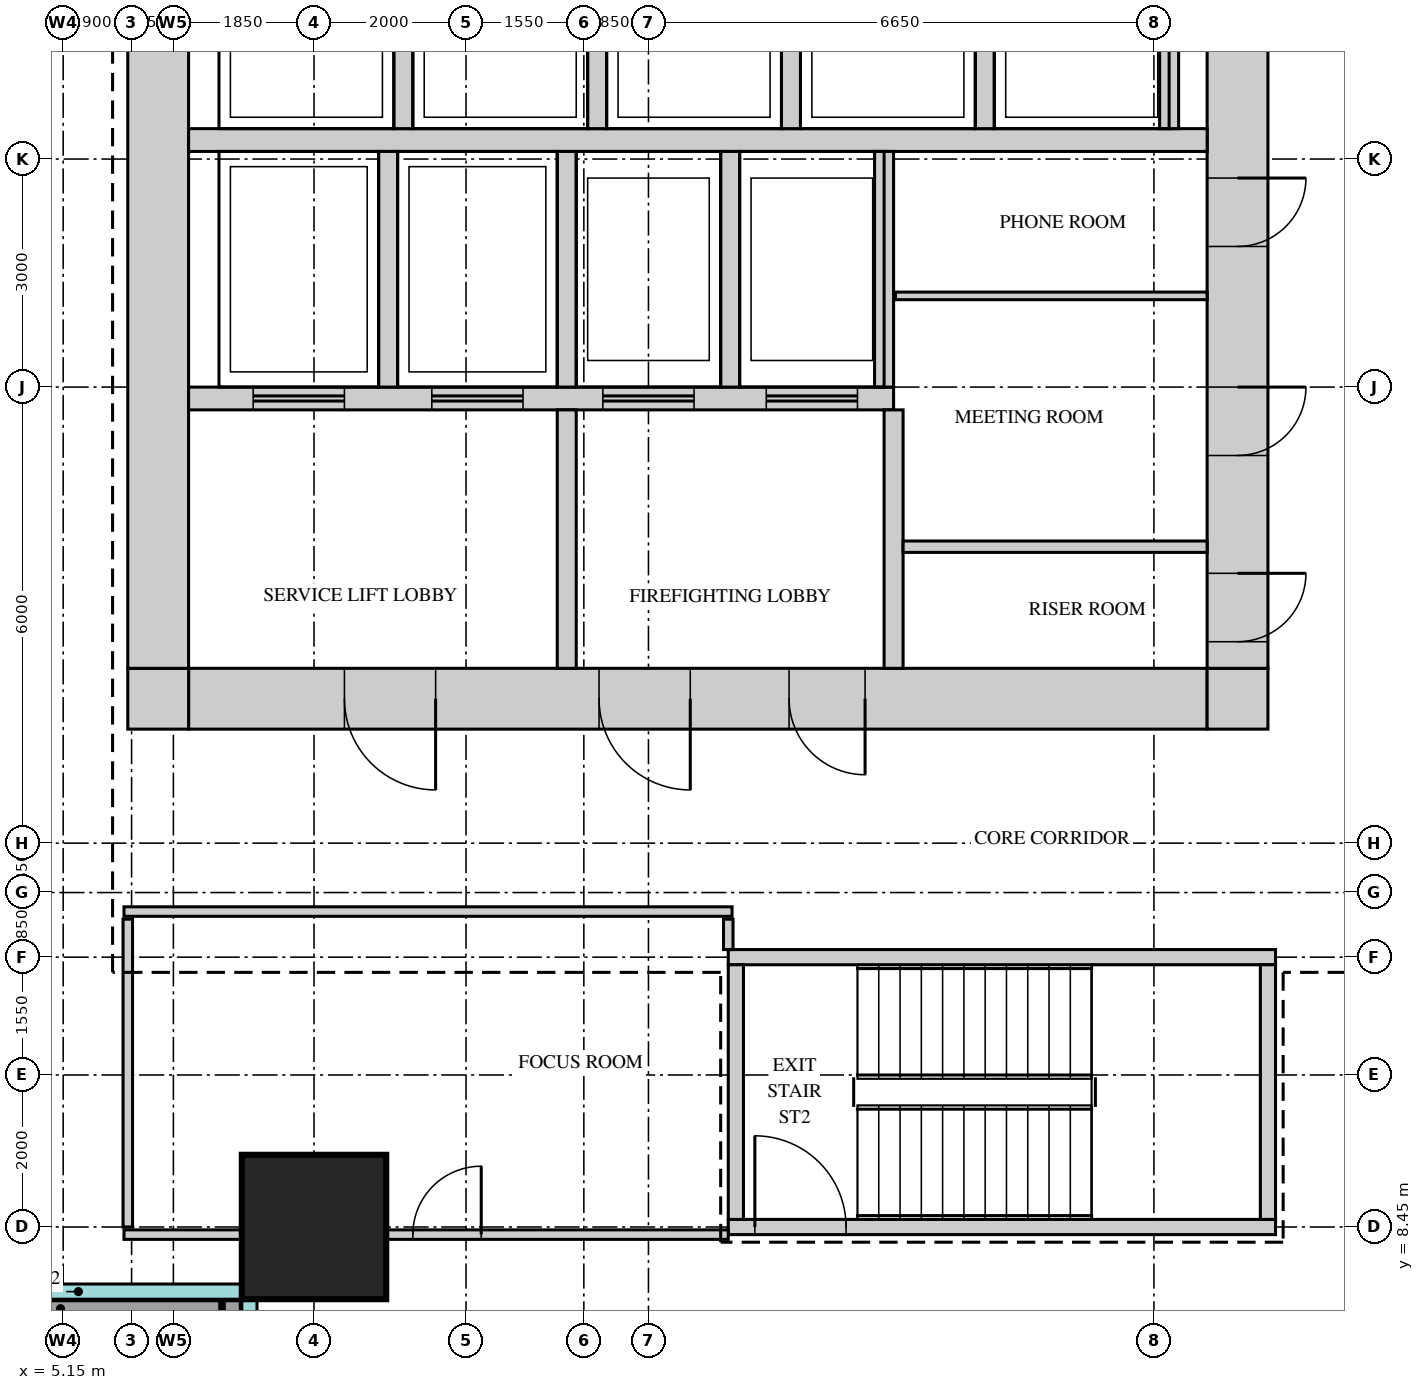
"""IFC4 building model, lengths in metres.
Left out: names, types, materials, properties, quantities, classifications, styles, units other than length and angle.
Written with IfcOpenShell. Run it as: python <this file> out.ifc"""

import sys

from ifc_helpers import new_model, si_unit, direction, frame, frame_2d, origin, origin_2d, place, context, subcontext, project, spatial, rectangle, extrude, source, transform, mapped, element, fill, save


model = new_model("IFC4")
c1 = context("Model", 3, precision=1e-05, world=origin(), true_north=direction((0.0, 1.0)))
c2 = subcontext(c1, "Body", "Model", "MODEL_VIEW")
j1 = project(units=[si_unit("LENGTHUNIT", "METRE"), si_unit("PLANEANGLEUNIT", "RADIAN")], contexts=[c1])
p1 = place(None, origin())
s1 = spatial("IfcSite", under=j1, at=p1, CompositionType="ELEMENT")
p2 = place(p1, origin())
s2 = spatial("IfcBuilding", under=s1, at=p2, CompositionType="ELEMENT")
p3 = place(p2, frame((0.0, 0.0, 164.7)))
s3 = spatial("IfcBuildingStorey", under=s2, at=p3, CompositionType="ELEMENT", Elevation=164.7)
m1 = source(origin(), c2, "Body", "SweptSolid", [
    extrude(rectangle(XDim=13.4, YDim=0.8, at=frame_2d((6.7, 0.0))), origin(), (0.0, 0.0, 1.0), 3.75),
])
p4 = place(p3, frame((6.8, 15.4, 0.0), z_axis=(0.0, 0.0, 1.0), x_axis=(1.0, 0.0, 0.0)))
e1 = element("IfcWall", 1, at=p4, inside=s3, PredefinedType="SHEAR", context=c2, shape_type="MappedRepresentation", body=[
    mapped(m1, transform((0.0, 0.0, 0.0))),
])
m2 = source(origin(), c2, "Body", "SweptSolid", [
    extrude(rectangle(XDim=1.2, YDim=2.1, at=frame_2d((0.6, 1.05))), frame((0.0, 0.41, 0.0), z_axis=(0.0, -1.0, 0.0), x_axis=(1.0, 0.0, 0.0)), (0.0, 0.0, 1.0), 0.82),
])
p5 = place(p4, frame((5.4, 0.0, 0.0)))
e2 = element("IfcOpeningElement", 2, at=p5, cuts=e1, PredefinedType="OPENING", context=c2, shape_type="MappedRepresentation", body=[
    mapped(m2, transform((0.0, 0.0, 0.0))),
])
p6 = place(p4, frame((2.05, 0.0, 0.0)))
e3 = element("IfcOpeningElement", 3, at=p6, cuts=e1, PredefinedType="OPENING", context=c2, shape_type="MappedRepresentation", body=[
    mapped(m2, transform((0.0, 0.0, 0.0))),
])
m3 = source(origin(), c2, "Body", "SweptSolid", [
    extrude(rectangle(XDim=1.0, YDim=2.1, at=frame_2d((0.5, 1.05))), frame((0.0, 0.41, 0.0), z_axis=(0.0, -1.0, 0.0), x_axis=(1.0, 0.0, 0.0)), (0.0, 0.0, 1.0), 0.82),
])
p7 = place(p4, frame((7.9, 0.0, 0.0)))
e4 = element("IfcOpeningElement", 4, at=p7, cuts=e1, PredefinedType="OPENING", context=c2, shape_type="MappedRepresentation", body=[
    mapped(m3, transform((0.0, 0.0, 0.0))),
])
m4 = source(origin(), c2, "Body", "SweptSolid", [
    extrude(rectangle(XDim=0.8, YDim=0.8, at=frame_2d((0.4, 0.0))), origin(), (0.0, 0.0, 1.0), 3.75),
])
for number, where, z_axis, x_axis in (
    (5, (20.2, 15.4, 0.0), (0.0, 0.0, 1.0), (1.0, 0.0, 0.0)),
    (6, (6.0, 15.4, 0.0), (0.0, 0.0, 1.0), (1.0, 0.0, 0.0)),
):
    element("IfcWall", number, at=place(p3, frame(where, z_axis=z_axis, x_axis=x_axis)), inside=s3, PredefinedType="SHEAR", context=c2, shape_type="MappedRepresentation", body=[
        mapped(m4, transform((0.0, 0.0, 0.0))),
    ])
m5 = source(origin(), c2, "Body", "SweptSolid", [
    extrude(rectangle(XDim=22.4, YDim=0.8, at=frame_2d((11.2, 0.0))), origin(), (0.0, 0.0, 1.0), 3.75),
])
p8 = place(p3, frame((20.6, 15.8, 0.0), z_axis=(0.0, 0.0, 1.0), x_axis=(0.0, 1.0, 0.0)))
e7 = element("IfcWall", 7, at=p8, inside=s3, PredefinedType="SHEAR", context=c2, shape_type="MappedRepresentation", body=[
    mapped(m5, transform((0.0, 0.0, 0.0))),
])
m6 = source(origin(), c2, "Body", "SweptSolid", [
    extrude(rectangle(XDim=1.8, YDim=2.1, at=frame_2d((0.9, 1.05))), frame((0.0, 0.41, 0.0), z_axis=(0.0, -1.0, 0.0), x_axis=(1.0, 0.0, 0.0)), (0.0, 0.0, 1.0), 0.82),
])
p9 = place(p8, frame((10.7, 0.0, 0.0)))
e8 = element("IfcOpeningElement", 8, at=p9, cuts=e7, PredefinedType="OPENING", context=c2, shape_type="MappedRepresentation", body=[
    mapped(m6, transform((0.0, 0.0, 0.0))),
])
m7 = source(origin(), c2, "Body", "SweptSolid", [
    extrude(rectangle(XDim=0.9, YDim=2.1, at=frame_2d((0.45, 1.05))), frame((0.0, 0.41, 0.0), z_axis=(0.0, -1.0, 0.0), x_axis=(1.0, 0.0, 0.0)), (0.0, 0.0, 1.0), 0.82),
])
p10 = place(p8, frame((0.35, 0.0, 0.0)))
e9 = element("IfcOpeningElement", 9, at=p10, cuts=e7, PredefinedType="OPENING", context=c2, shape_type="MappedRepresentation", body=[
    mapped(m7, transform((0.0, 0.0, 0.0))),
])
p11 = place(p8, frame((2.8, 0.0, 0.0)))
e10 = element("IfcOpeningElement", 10, at=p11, cuts=e7, PredefinedType="OPENING", context=c2, shape_type="MappedRepresentation", body=[
    mapped(m7, transform((0.0, 0.0, 0.0))),
])
p12 = place(p8, frame((5.55, 0.0, 0.0)))
e11 = element("IfcOpeningElement", 11, at=p12, cuts=e7, PredefinedType="OPENING", context=c2, shape_type="MappedRepresentation", body=[
    mapped(m7, transform((0.0, 0.0, 0.0))),
])
p13 = place(p3, frame((6.4, 15.8, 0.0), z_axis=(0.0, 0.0, 1.0), x_axis=(0.0, 1.0, 0.0)))
e12 = element("IfcWall", 12, at=p13, inside=s3, PredefinedType="SHEAR", context=c2, shape_type="MappedRepresentation", body=[
    mapped(m5, transform((0.0, 0.0, 0.0))),
])
m8 = source(origin(), c2, "Body", "SweptSolid", [
    extrude(rectangle(XDim=7.2, YDim=0.2, at=frame_2d((3.6, 0.0))), origin(), (0.0, 0.0, 1.0), 3.75),
])
p14 = place(p3, frame((13.9, 12.0, 0.0), z_axis=(0.0, 0.0, 1.0), x_axis=(1.0, 0.0, 0.0)))
e13 = element("IfcWall", 13, at=p14, inside=s3, PredefinedType="SHEAR", context=c2, shape_type="MappedRepresentation", body=[
    mapped(m8, transform((0.0, 0.0, 0.0))),
])
p15 = place(p3, frame((13.9, 8.45, 0.0), z_axis=(0.0, 0.0, 1.0), x_axis=(1.0, 0.0, 0.0)))
e14 = element("IfcWall", 14, at=p15, inside=s3, PredefinedType="SHEAR", context=c2, shape_type="MappedRepresentation", body=[
    mapped(m8, transform((0.0, 0.0, 0.0))),
])
m9 = source(origin(), c2, "Body", "SweptSolid", [
    extrude(rectangle(XDim=1.2, YDim=2.1, at=frame_2d((0.6, 1.05))), frame((0.0, 0.11, 0.0), z_axis=(0.0, -1.0, 0.0), x_axis=(1.0, 0.0, 0.0)), (0.0, 0.0, 1.0), 0.22),
])
p16 = place(p15, frame((0.35, 0.0, 0.0)))
e15 = element("IfcOpeningElement", 15, at=p16, cuts=e14, PredefinedType="OPENING", context=c2, shape_type="MappedRepresentation", body=[
    mapped(m9, transform((0.0, 0.0, 0.0))),
])
m10 = source(origin(), c2, "Body", "SweptSolid", [
    extrude(rectangle(XDim=3.35, YDim=0.2, at=frame_2d((1.675, 0.0))), origin(), (0.0, 0.0, 1.0), 3.75),
])
for number, where, z_axis, x_axis in (
    (16, (21.0, 8.55, 0.0), (0.0, 0.0, 1.0), (0.0, 1.0, 0.0)),
    (17, (14.0, 8.55, 0.0), (0.0, 0.0, 1.0), (0.0, 1.0, 0.0)),
):
    element("IfcWall", number, at=place(p3, frame(where, z_axis=z_axis, x_axis=x_axis)), inside=s3, PredefinedType="SHEAR", context=c2, shape_type="MappedRepresentation", body=[
        mapped(m10, transform((0.0, 0.0, 0.0))),
    ])
m11 = source(origin(), c2, "Body", "SweptSolid", [
    extrude(rectangle(XDim=13.4, YDim=0.3, at=frame_2d((6.7, 0.0))), origin(), (0.0, 0.0, 1.0), 3.75),
])
p17 = place(p3, frame((6.8, 22.75, 0.0), z_axis=(0.0, 0.0, 1.0), x_axis=(1.0, 0.0, 0.0)))
e18 = element("IfcWall", 18, at=p17, inside=s3, PredefinedType="STANDARD", context=c2, shape_type="MappedRepresentation", body=[
    mapped(m11, transform((0.0, 0.0, 0.0))),
])
m12 = source(origin(), c2, "Body", "SweptSolid", [
    extrude(rectangle(XDim=9.275, YDim=0.3, at=frame_2d((4.637, 0.0))), origin(), (0.0, 0.0, 1.0), 3.75),
])
p18 = place(p3, frame((6.8, 19.35, 0.0), z_axis=(0.0, 0.0, 1.0), x_axis=(1.0, 0.0, 0.0)))
e19 = element("IfcWall", 19, at=p18, inside=s3, PredefinedType="STANDARD", context=c2, shape_type="MappedRepresentation", body=[
    mapped(m12, transform((0.0, 0.0, 0.0))),
])
m13 = source(origin(), c2, "Body", "SweptSolid", [
    extrude(rectangle(XDim=1.2, YDim=2.1, at=frame_2d((0.6, 1.05))), frame((0.0, 0.16, 0.0), z_axis=(0.0, -1.0, 0.0), x_axis=(1.0, 0.0, 0.0)), (0.0, 0.0, 1.0), 0.32),
])
p19 = place(p18, frame((0.85, 0.0, 0.0)))
e20 = element("IfcOpeningElement", 20, at=p19, cuts=e19, PredefinedType="OPENING", context=c2, shape_type="MappedRepresentation", body=[
    mapped(m13, transform((0.0, 0.0, 0.0))),
])
p20 = place(p18, frame((3.2, 0.0, 0.0)))
e21 = element("IfcOpeningElement", 21, at=p20, cuts=e19, PredefinedType="OPENING", context=c2, shape_type="MappedRepresentation", body=[
    mapped(m13, transform((0.0, 0.0, 0.0))),
])
p21 = place(p18, frame((5.45, 0.0, 0.0)))
e22 = element("IfcOpeningElement", 22, at=p21, cuts=e19, PredefinedType="OPENING", context=c2, shape_type="MappedRepresentation", body=[
    mapped(m13, transform((0.0, 0.0, 0.0))),
])
p22 = place(p18, frame((7.6, 0.0, 0.0)))
e23 = element("IfcOpeningElement", 23, at=p22, cuts=e19, PredefinedType="OPENING", context=c2, shape_type="MappedRepresentation", body=[
    mapped(m13, transform((0.0, 0.0, 0.0))),
])
m14 = source(origin(), c2, "Body", "SweptSolid", [
    extrude(rectangle(XDim=3.1, YDim=0.25, at=frame_2d((1.55, 0.0))), origin(), (0.0, 0.0, 1.0), 3.75),
])
for number, where, z_axis, x_axis in (
    (24, (9.425, 19.5, 0.0), (0.0, 0.0, 1.0), (0.0, 1.0, 0.0)),
    (25, (11.775, 19.5, 0.0), (0.0, 0.0, 1.0), (0.0, 1.0, 0.0)),
    (26, (13.925, 19.5, 0.0), (0.0, 0.0, 1.0), (0.0, 1.0, 0.0)),
    (27, (15.95, 19.5, 0.0), (0.0, 0.0, 1.0), (0.0, 1.0, 0.0)),
):
    element("IfcWall", number, at=place(p3, frame(where, z_axis=z_axis, x_axis=x_axis)), inside=s3, PredefinedType="STANDARD", context=c2, shape_type="MappedRepresentation", body=[
        mapped(m14, transform((0.0, 0.0, 0.0))),
    ])
m15 = source(origin(), c2, "Body", "SweptSolid", [
    extrude(rectangle(XDim=2.4, YDim=0.25, at=frame_2d((1.2, 0.0))), origin(), (0.0, 0.0, 1.0), 3.75),
])
for number, where, z_axis, x_axis in (
    (28, (17.275, 22.9, 0.0), (0.0, 0.0, 1.0), (0.0, 1.0, 0.0)),
    (29, (19.7, 22.9, 0.0), (0.0, 0.0, 1.0), (0.0, 1.0, 0.0)),
    (30, (9.625, 22.9, 0.0), (0.0, 0.0, 1.0), (0.0, 1.0, 0.0)),
    (31, (12.175, 22.9, 0.0), (0.0, 0.0, 1.0), (0.0, 1.0, 0.0)),
    (32, (14.725, 22.9, 0.0), (0.0, 0.0, 1.0), (0.0, 1.0, 0.0)),
):
    element("IfcWall", number, at=place(p3, frame(where, z_axis=z_axis, x_axis=x_axis)), inside=s3, PredefinedType="STANDARD", context=c2, shape_type="MappedRepresentation", body=[
        mapped(m15, transform((0.0, 0.0, 0.0))),
    ])
m16 = source(origin(), c2, "Body", "SweptSolid", [
    extrude(rectangle(XDim=3.4, YDim=0.25, at=frame_2d((1.7, 0.0))), origin(), (0.0, 0.0, 1.0), 3.75),
])
for number, where, z_axis, x_axis in (
    (33, (16.075, 15.8, 0.0), (0.0, 0.0, 1.0), (0.0, 1.0, 0.0)),
    (34, (11.775, 15.8, 0.0), (0.0, 0.0, 1.0), (0.0, 1.0, 0.0)),
):
    element("IfcWall", number, at=place(p3, frame(where, z_axis=z_axis, x_axis=x_axis)), inside=s3, PredefinedType="STANDARD", context=c2, shape_type="MappedRepresentation", body=[
        mapped(m16, transform((0.0, 0.0, 0.0))),
    ])
m17 = source(origin(), c2, "Body", "SweptSolid", [
    extrude(rectangle(XDim=1.9, YDim=1.9, at=origin_2d()), origin(), (0.0, 0.0, 1.0), 4.0),
])
p23 = place(p3, frame((8.45, 8.45, 0.0), z_axis=(0.0, 0.0, 1.0), x_axis=(1.0, 0.0, 0.0)))
e35 = element("IfcColumn", 35, at=p23, inside=s3, PredefinedType="COLUMN", context=c2, shape_type="MappedRepresentation", body=[
    mapped(m17, transform((0.0, 0.0, 0.0))),
])
m18 = source(origin(), c2, "Body", "SweptSolid", [
    extrude(rectangle(XDim=4.5, YDim=0.25, at=frame_2d((2.25, 0.0))), origin(), (0.0, 0.0, 1.0), 1.1),
])
p24 = place(p3, frame((7.375, 3.0, 0.0), z_axis=(0.0, 0.0, 1.0), x_axis=(0.0, 1.0, 0.0)))
e36 = element("IfcWall", 36, at=p24, inside=s3, PredefinedType="SOLIDWALL", context=c2, shape_type="MappedRepresentation", body=[
    mapped(m18, transform((0.0, 0.0, 0.0))),
])
m19 = source(origin(), c2, "Body", "SweptSolid", [
    extrude(rectangle(XDim=4.23, YDim=0.25, at=frame_2d((2.115, 0.0))), origin(), (0.0, 0.0, 1.0), 1.1),
])
p25 = place(p3, frame((7.23, 7.375, 0.0), z_axis=(0.0, 0.0, 1.0), x_axis=(-1.0, 0.0, 0.0)))
e37 = element("IfcWall", 37, at=p25, inside=s3, PredefinedType="SOLIDWALL", context=c2, shape_type="MappedRepresentation", body=[
    mapped(m19, transform((0.0, 0.0, 0.0))),
])
m20 = source(origin(), c2, "Body", "SweptSolid", [
    extrude(rectangle(XDim=7.95, YDim=0.125, at=frame_2d((3.975, 0.0))), origin(), (0.0, 0.0, 1.0), 3.25),
])
p26 = place(p3, frame((5.95, 8.35, 0.0), z_axis=(0.0, 0.0, 1.0), x_axis=(1.0, 0.0, 0.0)))
e38 = element("IfcWall", 38, at=p26, inside=s3, PredefinedType="PARTITIONING", context=c2, shape_type="MappedRepresentation", body=[
    mapped(m20, transform((0.0, 0.0, 0.0))),
])
m21 = source(origin(), c2, "Body", "SweptSolid", [
    extrude(rectangle(XDim=0.9, YDim=2.1, at=frame_2d((0.45, 1.05))), frame((0.0, 0.073, 0.0), z_axis=(0.0, -1.0, 0.0), x_axis=(1.0, 0.0, 0.0)), (0.0, 0.0, 1.0), 0.145),
])
p27 = place(p26, frame((3.8, 0.0, 0.0)))
e39 = element("IfcOpeningElement", 39, at=p27, cuts=e38, PredefinedType="OPENING", context=c2, shape_type="MappedRepresentation", body=[
    mapped(m21, transform((0.0, 0.0, 0.0))),
])
m22 = source(origin(), c2, "Body", "SweptSolid", [
    extrude(rectangle(XDim=4.05, YDim=0.125, at=frame_2d((2.025, 0.0))), origin(), (0.0, 0.0, 1.0), 3.8),
])
p28 = place(p3, frame((6.0, 8.45, 0.0), z_axis=(0.0, 0.0, 1.0), x_axis=(0.0, 1.0, 0.0)))
e40 = element("IfcWall", 40, at=p28, inside=s3, PredefinedType="PARTITIONING", context=c2, shape_type="MappedRepresentation", body=[
    mapped(m22, transform((0.0, 0.0, 0.0))),
])
m23 = source(origin(), c2, "Body", "SweptSolid", [
    extrude(rectangle(XDim=0.4, YDim=0.125, at=frame_2d((0.2, 0.0))), origin(), (0.0, 0.0, 1.0), 3.8),
])
p29 = place(p3, frame((13.9, 12.1, 0.0), z_axis=(0.0, 0.0, 1.0), x_axis=(0.0, 1.0, 0.0)))
e41 = element("IfcWall", 41, at=p29, inside=s3, PredefinedType="PARTITIONING", context=c2, shape_type="MappedRepresentation", body=[
    mapped(m23, transform((0.0, 0.0, 0.0))),
])
m24 = source(origin(), c2, "Body", "SweptSolid", [
    extrude(rectangle(XDim=8.0, YDim=0.125, at=frame_2d((4.0, 0.0))), origin(), (0.0, 0.0, 1.0), 3.8),
])
p30 = place(p3, frame((5.95, 12.6, 0.0), z_axis=(0.0, 0.0, 1.0), x_axis=(1.0, 0.0, 0.0)))
e42 = element("IfcWall", 42, at=p30, inside=s3, PredefinedType="PARTITIONING", context=c2, shape_type="MappedRepresentation", body=[
    mapped(m24, transform((0.0, 0.0, 0.0))),
])
m25 = source(origin(), c2, "Body", "SweptSolid", [
    extrude(rectangle(XDim=4.0, YDim=0.15, at=frame_2d((2.0, 0.0))), origin(), (0.0, 0.0, 1.0), 3.8),
])
p31 = place(p3, frame((16.2, 17.4, 0.0), z_axis=(0.0, 0.0, 1.0), x_axis=(1.0, 0.0, 0.0)))
e43 = element("IfcWall", 43, at=p31, inside=s3, PredefinedType="PARTITIONING", context=c2, shape_type="MappedRepresentation", body=[
    mapped(m25, transform((0.0, 0.0, 0.0))),
])
m26 = source(origin(), c2, "Body", "SweptSolid", [
    extrude(rectangle(XDim=4.1, YDim=0.1, at=frame_2d((2.05, 0.0))), origin(), (0.0, 0.0, 1.0), 3.8),
])
p32 = place(p3, frame((16.1, 20.7, 0.0), z_axis=(0.0, 0.0, 1.0), x_axis=(1.0, 0.0, 0.0)))
e44 = element("IfcWall", 44, at=p32, inside=s3, PredefinedType="PARTITIONING", context=c2, shape_type="MappedRepresentation", body=[
    mapped(m26, transform((0.0, 0.0, 0.0))),
])
m27 = source(origin(), c2, "Body", "SweptSolid", [
    extrude(rectangle(XDim=0.9, YDim=2.1, at=frame_2d((0.45, 1.05))), frame((0.0, 0.35, 0.0), z_axis=(0.0, -1.0, 0.0), x_axis=(1.0, 0.0, 0.0)), (0.0, 0.0, 1.0), 0.7),
])
p33 = place(p10, origin())
e45 = element("IfcDoor", 45, at=p33, inside=s3, OperationType="SINGLE_SWING_RIGHT", PredefinedType="DOOR", context=c2, shape_type="MappedRepresentation", body=[
    mapped(m27, transform((0.0, 0.0, 0.0))),
])
fill(e9, e45)
p34 = place(p11, origin())
e46 = element("IfcDoor", 46, at=p34, inside=s3, OperationType="SINGLE_SWING_RIGHT", PredefinedType="DOOR", context=c2, shape_type="MappedRepresentation", body=[
    mapped(m27, transform((0.0, 0.0, 0.0))),
])
fill(e10, e46)
p35 = place(p12, origin())
e47 = element("IfcDoor", 47, at=p35, inside=s3, OperationType="SINGLE_SWING_RIGHT", PredefinedType="DOOR", context=c2, shape_type="MappedRepresentation", body=[
    mapped(m27, transform((0.0, 0.0, 0.0))),
])
fill(e11, e47)
m28 = source(origin(), c2, "Body", "SweptSolid", [
    extrude(rectangle(XDim=1.2, YDim=2.1, at=frame_2d((0.6, 1.05))), frame((0.0, 0.35, 0.0), z_axis=(0.0, -1.0, 0.0), x_axis=(1.0, 0.0, 0.0)), (0.0, 0.0, 1.0), 0.7),
])
p36 = place(p5, origin())
e48 = element("IfcDoor", 48, at=p36, inside=s3, OperationType="SINGLE_SWING_RIGHT", PredefinedType="DOOR", context=c2, shape_type="MappedRepresentation", body=[
    mapped(m28, transform((0.0, 0.0, 0.0))),
])
fill(e2, e48)
p37 = place(p6, origin())
e49 = element("IfcDoor", 49, at=p37, inside=s3, OperationType="SINGLE_SWING_RIGHT", PredefinedType="DOOR", context=c2, shape_type="MappedRepresentation", body=[
    mapped(m28, transform((0.0, 0.0, 0.0))),
])
fill(e3, e49)
m29 = source(origin(), c2, "Body", "SweptSolid", [
    extrude(rectangle(XDim=1.0, YDim=2.1, at=frame_2d((0.5, 1.05))), frame((0.0, 0.35, 0.0), z_axis=(0.0, -1.0, 0.0), x_axis=(1.0, 0.0, 0.0)), (0.0, 0.0, 1.0), 0.7),
])
p38 = place(p7, origin())
e50 = element("IfcDoor", 50, at=p38, inside=s3, OperationType="SINGLE_SWING_RIGHT", PredefinedType="DOOR", context=c2, shape_type="MappedRepresentation", body=[
    mapped(m29, transform((0.0, 0.0, 0.0))),
])
fill(e4, e50)
m30 = source(origin(), c2, "Body", "SweptSolid", [
    extrude(rectangle(XDim=0.9, YDim=2.1, at=frame_2d((0.45, 1.05))), frame((0.0, 0.025, 0.0), z_axis=(0.0, -1.0, 0.0), x_axis=(1.0, 0.0, 0.0)), (0.0, 0.0, 1.0), 0.05),
])
p39 = place(p27, origin())
e51 = element("IfcDoor", 51, at=p39, inside=s3, OperationType="SINGLE_SWING_LEFT", PredefinedType="DOOR", context=c2, shape_type="MappedRepresentation", body=[
    mapped(m30, transform((0.0, 0.0, 0.0))),
])
fill(e39, e51)
m31 = source(origin(), c2, "Body", "SweptSolid", [
    extrude(rectangle(XDim=1.2, YDim=2.1, at=frame_2d((0.6, 1.05))), frame((0.0, 0.025, 0.0), z_axis=(0.0, -1.0, 0.0), x_axis=(1.0, 0.0, 0.0)), (0.0, 0.0, 1.0), 0.05),
])
p40 = place(p16, origin())
e52 = element("IfcDoor", 52, at=p40, inside=s3, OperationType="SINGLE_SWING_RIGHT", PredefinedType="DOOR", context=c2, shape_type="MappedRepresentation", body=[
    mapped(m31, transform((0.0, 0.0, 0.0))),
])
fill(e15, e52)
p41 = place(p19, origin())
e53 = element("IfcDoor", 53, at=p41, inside=s3, OperationType="DOUBLE_DOOR_SLIDING", PredefinedType="DOOR", context=c2, shape_type="MappedRepresentation", body=[
    mapped(m31, transform((0.0, 0.0, 0.0))),
])
fill(e20, e53)
p42 = place(p20, origin())
e54 = element("IfcDoor", 54, at=p42, inside=s3, OperationType="DOUBLE_DOOR_SLIDING", PredefinedType="DOOR", context=c2, shape_type="MappedRepresentation", body=[
    mapped(m31, transform((0.0, 0.0, 0.0))),
])
fill(e21, e54)
p43 = place(p21, origin())
e55 = element("IfcDoor", 55, at=p43, inside=s3, OperationType="DOUBLE_DOOR_SLIDING", PredefinedType="DOOR", context=c2, shape_type="MappedRepresentation", body=[
    mapped(m31, transform((0.0, 0.0, 0.0))),
])
fill(e22, e55)
p44 = place(p22, origin())
e56 = element("IfcDoor", 56, at=p44, inside=s3, OperationType="DOUBLE_DOOR_SLIDING", PredefinedType="DOOR", context=c2, shape_type="MappedRepresentation", body=[
    mapped(m31, transform((0.0, 0.0, 0.0))),
])
fill(e23, e56)
save(model, sys.argv[1])
